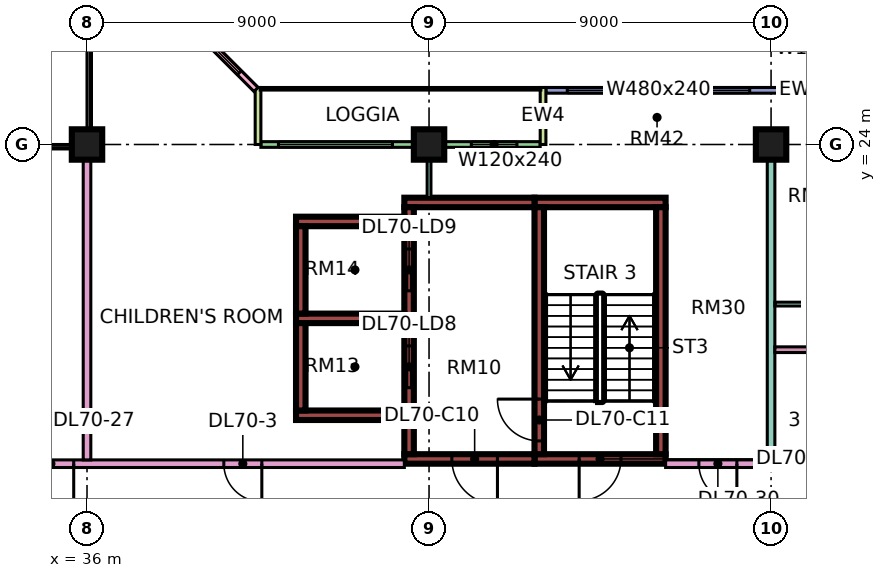
"""IFC4 building model, lengths in metres.
Left out: names, types, materials, properties, quantities, classifications, styles, units other than length and angle.
Written with IfcOpenShell. Run it as: python <this file> out.ifc"""

import sys

from ifc_helpers import new_model, si_unit, direction, frame, frame_2d, origin, origin_2d, place, context, subcontext, project, spatial, rectangle, extrude, element, fill, save


model = new_model("IFC4")
c1 = context("Model", 3, precision=1e-05, world=origin(), true_north=direction((0.0, 1.0)))
c2 = subcontext(c1, "Body", "Model", "MODEL_VIEW")
j1 = project(units=[si_unit("LENGTHUNIT", "METRE"), si_unit("PLANEANGLEUNIT", "RADIAN")], contexts=[c1])
p1 = place(None, origin())
s1 = spatial("IfcSite", under=j1, at=p1, CompositionType="ELEMENT")
p2 = place(p1, origin())
s2 = spatial("IfcBuilding", under=s1, at=p2, CompositionType="ELEMENT")
p3 = place(p2, frame((0.0, 0.0, 299.65)))
s3 = spatial("IfcBuildingStorey", under=s2, at=p3, CompositionType="ELEMENT", Elevation=299.65)
for number, where, z_axis, x_axis in (
    (1, (36.0, 24.0, 0.0), (0.0, 0.0, 1.0), (1.0, 0.0, 0.0)),
    (2, (45.0, 24.0, 0.0), (0.0, 0.0, 1.0), (1.0, 0.0, 0.0)),
    (3, (54.0, 24.0, 0.0), (0.0, 0.0, 1.0), (1.0, 0.0, 0.0)),
):
    element("IfcColumn", number, at=place(p3, frame(where, z_axis=z_axis, x_axis=x_axis)), inside=s3, PredefinedType="COLUMN", context=c2, shape_type="SweptSolid", body=[
        extrude(rectangle(XDim=0.8, YDim=0.8, at=origin_2d()), origin(), (0.0, 0.0, 1.0), 3.75),
    ])
p4 = place(p3, frame((47.775, 15.725, 0.0), z_axis=(0.0, 0.0, 1.0), x_axis=(1.0, 0.0, 0.0)))
e4 = element("IfcWall", 4, at=p4, inside=s3, PredefinedType="SHEAR", context=c2, shape_type="SweptSolid", body=[
    extrude(rectangle(XDim=3.45, YDim=0.25, at=frame_2d((1.725, 0.0))), origin(), (0.0, 0.0, 1.0), 3.75),
])
p5 = place(p4, frame((1.175, 0.0, 0.0)))
e5 = element("IfcOpeningElement", 5, at=p5, cuts=e4, PredefinedType="OPENING", context=c2, shape_type="SweptSolid", body=[
    extrude(rectangle(XDim=1.1, YDim=2.2, at=frame_2d((0.55, 1.1))), frame((0.0, 0.135, 0.0), z_axis=(0.0, -1.0, 0.0), x_axis=(1.0, 0.0, 0.0)), (0.0, 0.0, 1.0), 0.27),
])
p6 = place(p3, frame((47.775, 22.475, 0.0), z_axis=(0.0, 0.0, 1.0), x_axis=(1.0, 0.0, 0.0)))
e6 = element("IfcWall", 6, at=p6, inside=s3, PredefinedType="SHEAR", context=c2, shape_type="SweptSolid", body=[
    extrude(rectangle(XDim=3.45, YDim=0.25, at=frame_2d((1.725, 0.0))), origin(), (0.0, 0.0, 1.0), 3.75),
])
p7 = place(p3, frame((47.9, 15.85, 0.0), z_axis=(0.0, 0.0, 1.0), x_axis=(0.0, 1.0, 0.0)))
e7 = element("IfcWall", 7, at=p7, inside=s3, PredefinedType="SHEAR", context=c2, shape_type="SweptSolid", body=[
    extrude(rectangle(XDim=6.5, YDim=0.25, at=frame_2d((3.25, 0.0))), origin(), (0.0, 0.0, 1.0), 3.75),
])
p8 = place(p7, frame((0.35, 0.0, 0.0)))
e8 = element("IfcOpeningElement", 8, at=p8, cuts=e7, PredefinedType="OPENING", context=c2, shape_type="SweptSolid", body=[
    extrude(rectangle(XDim=1.1, YDim=2.2, at=frame_2d((0.55, 1.1))), frame((0.0, 0.135, 0.0), z_axis=(0.0, -1.0, 0.0), x_axis=(1.0, 0.0, 0.0)), (0.0, 0.0, 1.0), 0.27),
])
p9 = place(p3, frame((51.1, 15.85, 0.0), z_axis=(0.0, 0.0, 1.0), x_axis=(0.0, 1.0, 0.0)))
e9 = element("IfcWall", 9, at=p9, inside=s3, PredefinedType="SHEAR", context=c2, shape_type="SweptSolid", body=[
    extrude(rectangle(XDim=6.5, YDim=0.25, at=frame_2d((3.25, 0.0))), origin(), (0.0, 0.0, 1.0), 3.75),
])
p10 = place(p3, frame((44.35, 15.725, 0.0), z_axis=(0.0, 0.0, 1.0), x_axis=(1.0, 0.0, 0.0)))
e10 = element("IfcWall", 10, at=p10, inside=s3, PredefinedType="SHEAR", context=c2, shape_type="SweptSolid", body=[
    extrude(rectangle(XDim=3.425, YDim=0.25, at=frame_2d((1.712, 0.0))), origin(), (0.0, 0.0, 1.0), 3.75),
])
p11 = place(p10, frame((1.25, 0.0, 0.0)))
e11 = element("IfcOpeningElement", 11, at=p11, cuts=e10, PredefinedType="OPENING", context=c2, shape_type="SweptSolid", body=[
    extrude(rectangle(XDim=1.2, YDim=2.2, at=frame_2d((0.6, 1.1))), frame((0.0, 0.135, 0.0), z_axis=(0.0, -1.0, 0.0), x_axis=(1.0, 0.0, 0.0)), (0.0, 0.0, 1.0), 0.27),
])
p12 = place(p3, frame((44.35, 22.475, 0.0), z_axis=(0.0, 0.0, 1.0), x_axis=(1.0, 0.0, 0.0)))
e12 = element("IfcWall", 12, at=p12, inside=s3, PredefinedType="SHEAR", context=c2, shape_type="SweptSolid", body=[
    extrude(rectangle(XDim=3.425, YDim=0.25, at=frame_2d((1.712, 0.0))), origin(), (0.0, 0.0, 1.0), 3.75),
])
p13 = place(p3, frame((44.475, 15.85, 0.0), z_axis=(0.0, 0.0, 1.0), x_axis=(0.0, 1.0, 0.0)))
e13 = element("IfcWall", 13, at=p13, inside=s3, PredefinedType="SHEAR", context=c2, shape_type="SweptSolid", body=[
    extrude(rectangle(XDim=6.5, YDim=0.25, at=frame_2d((3.25, 0.0))), origin(), (0.0, 0.0, 1.0), 3.75),
])
p14 = place(p13, frame((1.75, 0.0, 0.0)))
e14 = element("IfcOpeningElement", 14, at=p14, cuts=e13, PredefinedType="OPENING", context=c2, shape_type="SweptSolid", body=[
    extrude(rectangle(XDim=1.1, YDim=2.2, at=frame_2d((0.55, 1.1))), frame((0.0, 0.135, 0.0), z_axis=(0.0, -1.0, 0.0), x_axis=(1.0, 0.0, 0.0)), (0.0, 0.0, 1.0), 0.27),
])
p15 = place(p13, frame((4.3, 0.0, 0.0)))
e15 = element("IfcOpeningElement", 15, at=p15, cuts=e13, PredefinedType="OPENING", context=c2, shape_type="SweptSolid", body=[
    extrude(rectangle(XDim=1.1, YDim=2.2, at=frame_2d((0.55, 1.1))), frame((0.0, 0.135, 0.0), z_axis=(0.0, -1.0, 0.0), x_axis=(1.0, 0.0, 0.0)), (0.0, 0.0, 1.0), 0.27),
])
for number, where, z_axis, x_axis in (
    (16, (41.5, 16.875, 0.0), (0.0, 0.0, 1.0), (1.0, 0.0, 0.0)),
    (17, (41.5, 19.425, 0.0), (0.0, 0.0, 1.0), (1.0, 0.0, 0.0)),
    (18, (41.5, 21.975, 0.0), (0.0, 0.0, 1.0), (1.0, 0.0, 0.0)),
):
    element("IfcWall", number, at=place(p3, frame(where, z_axis=z_axis, x_axis=x_axis)), inside=s3, PredefinedType="SHEAR", context=c2, shape_type="SweptSolid", body=[
        extrude(rectangle(XDim=2.85, YDim=0.25, at=frame_2d((1.425, 0.0))), origin(), (0.0, 0.0, 1.0), 3.75),
    ])
for number, where, z_axis, x_axis in (
    (19, (41.625, 17.0, 0.0), (0.0, 0.0, 1.0), (0.0, 1.0, 0.0)),
    (20, (41.625, 19.55, 0.0), (0.0, 0.0, 1.0), (0.0, 1.0, 0.0)),
):
    element("IfcWall", number, at=place(p3, frame(where, z_axis=z_axis, x_axis=x_axis)), inside=s3, PredefinedType="SHEAR", context=c2, shape_type="SweptSolid", body=[
        extrude(rectangle(XDim=2.3, YDim=0.25, at=frame_2d((1.15, 0.0))), origin(), (0.0, 0.0, 1.0), 3.75),
    ])
p16 = place(p3, frame((61.5, 25.425, 0.0), z_axis=(0.0, 0.0, 1.0), x_axis=(-1.0, 0.0, 0.0)))
e21 = element("IfcWall", 21, at=p16, inside=s3, PredefinedType="SOLIDWALL", context=c2, shape_type="SweptSolid", body=[
    extrude(rectangle(XDim=13.425, YDim=0.15, at=frame_2d((6.712, 0.0))), origin(), (0.0, 0.0, 1.0), 3.35),
])
p17 = place(p16, frame((0.75, 0.0, 0.45)))
e22 = element("IfcOpeningElement", 22, at=p17, cuts=e21, PredefinedType="OPENING", context=c2, shape_type="SweptSolid", body=[
    extrude(rectangle(XDim=3.0, YDim=2.4, at=frame_2d((1.5, 1.2))), frame((0.0, 0.085, 0.0), z_axis=(0.0, -1.0, 0.0), x_axis=(1.0, 0.0, 0.0)), (0.0, 0.0, 1.0), 0.17),
])
p18 = place(p16, frame((5.1, 0.0, 0.45)))
e23 = element("IfcOpeningElement", 23, at=p18, cuts=e21, PredefinedType="OPENING", context=c2, shape_type="SweptSolid", body=[
    extrude(rectangle(XDim=1.8, YDim=2.4, at=frame_2d((0.9, 1.2))), frame((0.0, 0.085, 0.0), z_axis=(0.0, -1.0, 0.0), x_axis=(1.0, 0.0, 0.0)), (0.0, 0.0, 1.0), 0.17),
])
p19 = place(p16, frame((8.062, 0.0, 0.45)))
e24 = element("IfcOpeningElement", 24, at=p19, cuts=e21, PredefinedType="OPENING", context=c2, shape_type="SweptSolid", body=[
    extrude(rectangle(XDim=4.8, YDim=2.4, at=frame_2d((2.4, 1.2))), frame((0.0, 0.085, 0.0), z_axis=(0.0, -1.0, 0.0), x_axis=(1.0, 0.0, 0.0)), (0.0, 0.0, 1.0), 0.17),
])
p20 = place(p3, frame((47.925, 24.0, 0.0), z_axis=(0.0, 0.0, 1.0), x_axis=(-1.0, 0.0, 0.0)))
e25 = element("IfcWall", 25, at=p20, inside=s3, PredefinedType="SOLIDWALL", context=c2, shape_type="SweptSolid", body=[
    extrude(rectangle(XDim=7.35, YDim=0.15, at=frame_2d((3.675, 0.0))), origin(), (0.0, 0.0, 1.0), 3.35),
])
p21 = place(p20, frame((0.613, 0.0, 0.45)))
e26 = element("IfcOpeningElement", 26, at=p21, cuts=e25, PredefinedType="OPENING", context=c2, shape_type="SweptSolid", body=[
    extrude(rectangle(XDim=1.2, YDim=2.4, at=frame_2d((0.6, 1.2))), frame((0.0, 0.085, 0.0), z_axis=(0.0, -1.0, 0.0), x_axis=(1.0, 0.0, 0.0)), (0.0, 0.0, 1.0), 0.17),
])
p22 = place(p20, frame((3.887, 0.0, 0.45)))
e27 = element("IfcOpeningElement", 27, at=p22, cuts=e25, PredefinedType="OPENING", context=c2, shape_type="SweptSolid", body=[
    extrude(rectangle(XDim=3.0, YDim=2.4, at=frame_2d((1.5, 1.2))), frame((0.0, 0.085, 0.0), z_axis=(0.0, -1.0, 0.0), x_axis=(1.0, 0.0, 0.0)), (0.0, 0.0, 1.0), 0.17),
])
for number, where, z_axis, x_axis in (
    (28, (48.0, 25.5, 0.0), (0.0, 0.0, 1.0), (0.0, -1.0, 0.0)),
    (29, (40.5, 25.5, 0.0), (0.0, 0.0, 1.0), (0.0, -1.0, 0.0)),
):
    element("IfcWall", number, at=place(p3, frame(where, z_axis=z_axis, x_axis=x_axis)), inside=s3, PredefinedType="SOLIDWALL", context=c2, shape_type="SweptSolid", body=[
        extrude(rectangle(XDim=1.5, YDim=0.15, at=frame_2d((0.75, 0.0))), origin(), (0.0, 0.0, 1.0), 3.35),
    ])
p23 = place(p3, frame((40.447, 25.447, 0.0), z_axis=(0.0, 0.0, 1.0), x_axis=(-0.707106781187, 0.707106781187, 0.0)))
e30 = element("IfcWall", 30, at=p23, inside=s3, PredefinedType="SOLIDWALL", context=c2, shape_type="SweptSolid", body=[
    extrude(rectangle(XDim=4.243, YDim=0.15, at=frame_2d((2.121, 0.0))), origin(), (0.0, 0.0, 1.0), 3.35),
])
p24 = place(p23, frame((0.621, 0.0, 0.45)))
e31 = element("IfcOpeningElement", 31, at=p24, cuts=e30, PredefinedType="OPENING", context=c2, shape_type="SweptSolid", body=[
    extrude(rectangle(XDim=3.0, YDim=2.4, at=frame_2d((1.5, 1.2))), frame((0.0, 0.085, 0.0), z_axis=(0.0, -1.0, 0.0), x_axis=(1.0, 0.0, 0.0)), (0.0, 0.0, 1.0), 0.17),
])
p25 = place(p3, frame((34.0, 15.6, 0.0), z_axis=(0.0, 0.0, 1.0), x_axis=(1.0, 0.0, 0.0)))
e32 = element("IfcWall", 32, at=p25, inside=s3, PredefinedType="PARTITIONING", context=c2, shape_type="SweptSolid", body=[
    extrude(rectangle(XDim=10.35, YDim=0.2, at=frame_2d((5.175, 0.0))), origin(), (0.0, 0.0, 1.0), 3.35),
])
p26 = place(p25, frame((5.6, 0.0, 0.0)))
e33 = element("IfcOpeningElement", 33, at=p26, cuts=e32, PredefinedType="OPENING", context=c2, shape_type="SweptSolid", body=[
    extrude(rectangle(XDim=1.0, YDim=2.1, at=frame_2d((0.5, 1.05))), frame((0.0, 0.11, 0.0), z_axis=(0.0, -1.0, 0.0), x_axis=(1.0, 0.0, 0.0)), (0.0, 0.0, 1.0), 0.22),
])
p27 = place(p25, frame((0.45, 0.0, 0.0)))
e34 = element("IfcOpeningElement", 34, at=p27, cuts=e32, PredefinedType="OPENING", context=c2, shape_type="SweptSolid", body=[
    extrude(rectangle(XDim=1.2, YDim=2.1, at=frame_2d((0.6, 1.05))), frame((0.0, 0.11, 0.0), z_axis=(0.0, -1.0, 0.0), x_axis=(1.0, 0.0, 0.0)), (0.0, 0.0, 1.0), 0.22),
])
p28 = place(p3, frame((36.0, 15.7, 0.0), z_axis=(0.0, 0.0, 1.0), x_axis=(0.0, 1.0, 0.0)))
e35 = element("IfcWall", 35, at=p28, inside=s3, PredefinedType="PARTITIONING", context=c2, shape_type="SweptSolid", body=[
    extrude(rectangle(XDim=8.3, YDim=0.2, at=frame_2d((4.15, 0.0))), origin(), (0.0, 0.0, 1.0), 3.35),
])
p29 = place(p3, frame((45.0, 22.6, 0.0), z_axis=(0.0, 0.0, 1.0), x_axis=(0.0, 1.0, 0.0)))
e36 = element("IfcWall", 36, at=p29, inside=s3, PredefinedType="PARTITIONING", context=c2, shape_type="SweptSolid", body=[
    extrude(rectangle(XDim=1.326, YDim=0.1, at=frame_2d((0.663, 0.0))), origin(), (0.0, 0.0, 1.0), 3.35),
])
p30 = place(p3, frame((51.225, 15.6, 0.0), z_axis=(0.0, 0.0, 1.0), x_axis=(1.0, 0.0, 0.0)))
e37 = element("IfcWall", 37, at=p30, inside=s3, PredefinedType="PARTITIONING", context=c2, shape_type="SweptSolid", body=[
    extrude(rectangle(XDim=11.701, YDim=0.2, at=frame_2d((5.851, 0.0))), origin(), (0.0, 0.0, 1.0), 3.35),
])
p31 = place(p30, frame((9.725, 0.0, 0.0)))
e38 = element("IfcOpeningElement", 38, at=p31, cuts=e37, PredefinedType="OPENING", context=c2, shape_type="SweptSolid", body=[
    extrude(rectangle(XDim=1.0, YDim=2.1, at=frame_2d((0.5, 1.05))), frame((0.0, 0.11, 0.0), z_axis=(0.0, -1.0, 0.0), x_axis=(1.0, 0.0, 0.0)), (0.0, 0.0, 1.0), 0.22),
])
p32 = place(p30, frame((0.875, 0.0, 0.0)))
e39 = element("IfcOpeningElement", 39, at=p32, cuts=e37, PredefinedType="OPENING", context=c2, shape_type="SweptSolid", body=[
    extrude(rectangle(XDim=1.0, YDim=2.1, at=frame_2d((0.5, 1.05))), frame((0.0, 0.11, 0.0), z_axis=(0.0, -1.0, 0.0), x_axis=(1.0, 0.0, 0.0)), (0.0, 0.0, 1.0), 0.22),
])
p33 = place(p3, frame((54.0, 15.7, 0.0), z_axis=(0.0, 0.0, 1.0), x_axis=(0.0, 1.0, 0.0)))
e40 = element("IfcWall", 40, at=p33, inside=s3, PredefinedType="PARTITIONING", context=c2, shape_type="SweptSolid", body=[
    extrude(rectangle(XDim=8.3, YDim=0.2, at=frame_2d((4.15, 0.0))), origin(), (0.0, 0.0, 1.0), 3.35),
])
p34 = place(p3, frame((54.1, 18.6, 0.0), z_axis=(0.0, 0.0, 1.0), x_axis=(1.0, 0.0, 0.0)))
e41 = element("IfcWall", 41, at=p34, inside=s3, PredefinedType="PARTITIONING", context=c2, shape_type="SweptSolid", body=[
    extrude(rectangle(XDim=5.975, YDim=0.15, at=frame_2d((2.987, 0.0))), origin(), (0.0, 0.0, 1.0), 3.35),
])
p35 = place(p34, frame((4.25, 0.0, 0.0)))
e42 = element("IfcOpeningElement", 42, at=p35, cuts=e41, PredefinedType="OPENING", context=c2, shape_type="SweptSolid", body=[
    extrude(rectangle(XDim=0.8, YDim=2.1, at=frame_2d((0.4, 1.05))), frame((0.0, 0.085, 0.0), z_axis=(0.0, -1.0, 0.0), x_axis=(1.0, 0.0, 0.0)), (0.0, 0.0, 1.0), 0.17),
])
p36 = place(p34, frame((1.25, 0.0, 0.0)))
e43 = element("IfcOpeningElement", 43, at=p36, cuts=e41, PredefinedType="OPENING", context=c2, shape_type="SweptSolid", body=[
    extrude(rectangle(XDim=0.9, YDim=2.1, at=frame_2d((0.45, 1.05))), frame((0.0, 0.085, 0.0), z_axis=(0.0, -1.0, 0.0), x_axis=(1.0, 0.0, 0.0)), (0.0, 0.0, 1.0), 0.17),
])
p37 = place(p3, frame((54.1, 19.8, 0.0), z_axis=(0.0, 0.0, 1.0), x_axis=(1.0, 0.0, 0.0)))
e44 = element("IfcWall", 44, at=p37, inside=s3, PredefinedType="PARTITIONING", context=c2, shape_type="SweptSolid", body=[
    extrude(rectangle(XDim=2.85, YDim=0.1, at=frame_2d((1.425, 0.0))), origin(), (0.0, 0.0, 1.0), 3.35),
])
p38 = place(p18, origin())
e45 = element("IfcWindow", 45, at=p38, inside=s3, PartitioningType="SINGLE_PANEL", PredefinedType="WINDOW", context=c2, shape_type="SweptSolid", body=[
    extrude(rectangle(XDim=1.8, YDim=2.4, at=frame_2d((0.9, 1.2))), frame((0.0, 0.03, 0.0), z_axis=(0.0, -1.0, 0.0), x_axis=(1.0, 0.0, 0.0)), (0.0, 0.0, 1.0), 0.06),
])
fill(e23, e45)
p39 = place(p19, origin())
e46 = element("IfcWindow", 46, at=p39, inside=s3, PartitioningType="SINGLE_PANEL", PredefinedType="WINDOW", context=c2, shape_type="SweptSolid", body=[
    extrude(rectangle(XDim=4.8, YDim=2.4, at=frame_2d((2.4, 1.2))), frame((0.0, 0.03, 0.0), z_axis=(0.0, -1.0, 0.0), x_axis=(1.0, 0.0, 0.0)), (0.0, 0.0, 1.0), 0.06),
])
fill(e24, e46)
p40 = place(p21, origin())
e47 = element("IfcWindow", 47, at=p40, inside=s3, PartitioningType="SINGLE_PANEL", PredefinedType="WINDOW", context=c2, shape_type="SweptSolid", body=[
    extrude(rectangle(XDim=1.2, YDim=2.4, at=frame_2d((0.6, 1.2))), frame((0.0, 0.03, 0.0), z_axis=(0.0, -1.0, 0.0), x_axis=(1.0, 0.0, 0.0)), (0.0, 0.0, 1.0), 0.06),
])
fill(e26, e47)
p41 = place(p22, origin())
e48 = element("IfcWindow", 48, at=p41, inside=s3, PartitioningType="SINGLE_PANEL", PredefinedType="WINDOW", context=c2, shape_type="SweptSolid", body=[
    extrude(rectangle(XDim=3.0, YDim=2.4, at=frame_2d((1.5, 1.2))), frame((0.0, 0.03, 0.0), z_axis=(0.0, -1.0, 0.0), x_axis=(1.0, 0.0, 0.0)), (0.0, 0.0, 1.0), 0.06),
])
fill(e27, e48)
p42 = place(p24, origin())
e49 = element("IfcWindow", 49, at=p42, inside=s3, PartitioningType="SINGLE_PANEL", PredefinedType="WINDOW", context=c2, shape_type="SweptSolid", body=[
    extrude(rectangle(XDim=3.0, YDim=2.4, at=frame_2d((1.5, 1.2))), frame((0.0, 0.03, 0.0), z_axis=(0.0, -1.0, 0.0), x_axis=(1.0, 0.0, 0.0)), (0.0, 0.0, 1.0), 0.06),
])
fill(e31, e49)
p43 = place(p5, frame((1.1, 0.0, 0.0), z_axis=(0.0, 0.0, 1.0), x_axis=(-1.0, 0.0, 0.0)))
e50 = element("IfcDoor", 50, at=p43, inside=s3, OperationType="SINGLE_SWING_LEFT", PredefinedType="DOOR", context=c2, shape_type="SweptSolid", body=[
    extrude(rectangle(XDim=1.1, YDim=2.2, at=frame_2d((0.55, 1.1))), frame((0.0, 0.025, 0.0), z_axis=(0.0, -1.0, 0.0), x_axis=(1.0, 0.0, 0.0)), (0.0, 0.0, 1.0), 0.05),
])
fill(e5, e50)
p44 = place(p11, origin())
e51 = element("IfcDoor", 51, at=p44, inside=s3, OperationType="SINGLE_SWING_RIGHT", PredefinedType="DOOR", context=c2, shape_type="SweptSolid", body=[
    extrude(rectangle(XDim=1.2, YDim=2.2, at=frame_2d((0.6, 1.1))), frame((0.0, 0.025, 0.0), z_axis=(0.0, -1.0, 0.0), x_axis=(1.0, 0.0, 0.0)), (0.0, 0.0, 1.0), 0.05),
])
fill(e11, e51)
p45 = place(p8, frame((1.1, 0.0, 0.0), z_axis=(0.0, 0.0, 1.0), x_axis=(-1.0, 0.0, 0.0)))
e52 = element("IfcDoor", 52, at=p45, inside=s3, OperationType="SINGLE_SWING_RIGHT", PredefinedType="DOOR", context=c2, shape_type="SweptSolid", body=[
    extrude(rectangle(XDim=1.1, YDim=2.2, at=frame_2d((0.55, 1.1))), frame((0.0, 0.025, 0.0), z_axis=(0.0, -1.0, 0.0), x_axis=(1.0, 0.0, 0.0)), (0.0, 0.0, 1.0), 0.05),
])
fill(e8, e52)
p46 = place(p14, origin())
e53 = element("IfcDoor", 53, at=p46, inside=s3, OperationType="DOUBLE_DOOR_SLIDING", PredefinedType="DOOR", context=c2, shape_type="SweptSolid", body=[
    extrude(rectangle(XDim=1.1, YDim=2.2, at=frame_2d((0.55, 1.1))), frame((0.0, 0.025, 0.0), z_axis=(0.0, -1.0, 0.0), x_axis=(1.0, 0.0, 0.0)), (0.0, 0.0, 1.0), 0.05),
])
fill(e14, e53)
p47 = place(p15, origin())
e54 = element("IfcDoor", 54, at=p47, inside=s3, OperationType="DOUBLE_DOOR_SLIDING", PredefinedType="DOOR", context=c2, shape_type="SweptSolid", body=[
    extrude(rectangle(XDim=1.1, YDim=2.2, at=frame_2d((0.55, 1.1))), frame((0.0, 0.025, 0.0), z_axis=(0.0, -1.0, 0.0), x_axis=(1.0, 0.0, 0.0)), (0.0, 0.0, 1.0), 0.05),
])
fill(e15, e54)
p48 = place(p26, origin())
e55 = element("IfcDoor", 55, at=p48, inside=s3, OperationType="SINGLE_SWING_RIGHT", PredefinedType="DOOR", context=c2, shape_type="SweptSolid", body=[
    extrude(rectangle(XDim=1.0, YDim=2.1, at=frame_2d((0.5, 1.05))), frame((0.0, 0.025, 0.0), z_axis=(0.0, -1.0, 0.0), x_axis=(1.0, 0.0, 0.0)), (0.0, 0.0, 1.0), 0.05),
])
fill(e33, e55)
p49 = place(p27, origin())
e56 = element("IfcDoor", 56, at=p49, inside=s3, OperationType="SINGLE_SWING_RIGHT", PredefinedType="DOOR", context=c2, shape_type="SweptSolid", body=[
    extrude(rectangle(XDim=1.2, YDim=2.1, at=frame_2d((0.6, 1.05))), frame((0.0, 0.025, 0.0), z_axis=(0.0, -1.0, 0.0), x_axis=(1.0, 0.0, 0.0)), (0.0, 0.0, 1.0), 0.05),
])
fill(e34, e56)
p50 = place(p32, origin())
e57 = element("IfcDoor", 57, at=p50, inside=s3, OperationType="SINGLE_SWING_RIGHT", PredefinedType="DOOR", context=c2, shape_type="SweptSolid", body=[
    extrude(rectangle(XDim=1.0, YDim=2.1, at=frame_2d((0.5, 1.05))), frame((0.0, 0.025, 0.0), z_axis=(0.0, -1.0, 0.0), x_axis=(1.0, 0.0, 0.0)), (0.0, 0.0, 1.0), 0.05),
])
fill(e39, e57)
save(model, sys.argv[1])
